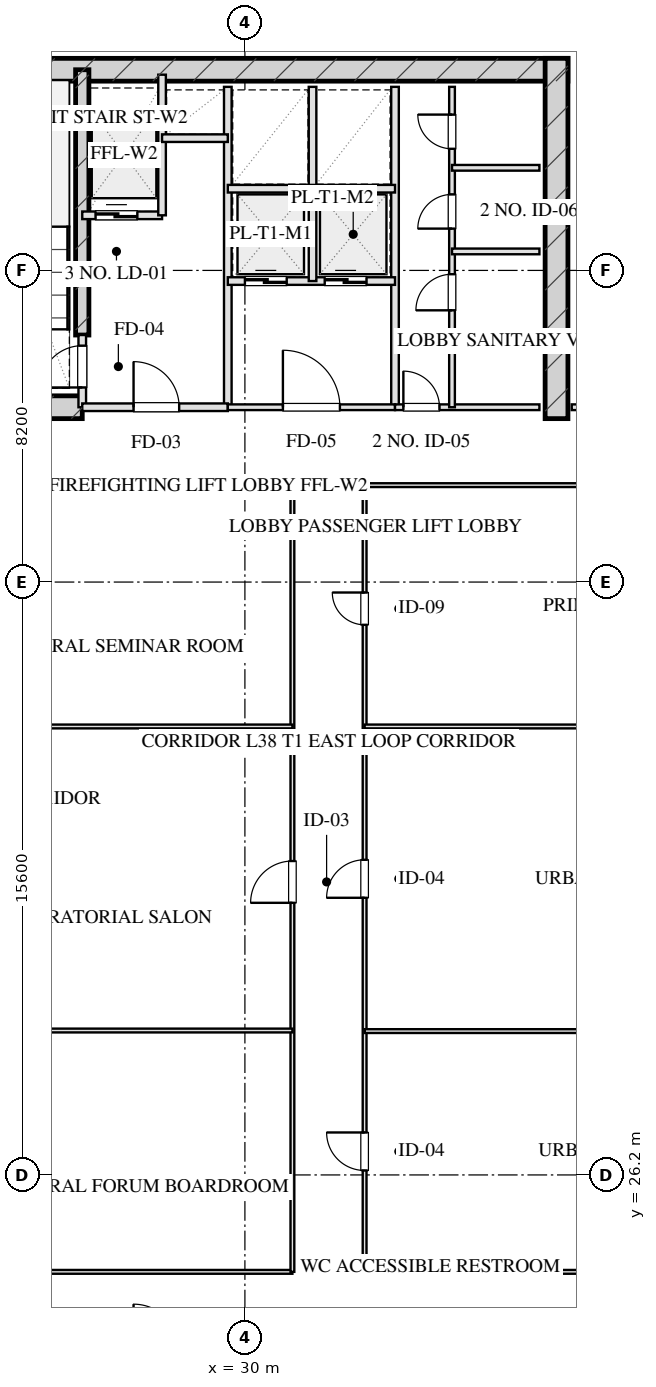
"""IFC4 building model, lengths in metres.
Left out: names, types, materials, properties, quantities, classifications, styles, units other than length and angle.
Written with IfcOpenShell. Run it as: python <this file> out.ifc"""

import sys

from ifc_helpers import new_model, si_unit, direction, frame, frame_2d, origin, place, context, subcontext, project, spatial, rectangle, extrude, element, fill, save


model = new_model("IFC4")
c1 = context("Model", 3, precision=1e-05, world=origin(), true_north=direction((0.0, 1.0)))
c2 = subcontext(c1, "Body", "Model", "MODEL_VIEW")
j1 = project(units=[si_unit("LENGTHUNIT", "METRE"), si_unit("PLANEANGLEUNIT", "RADIAN")], contexts=[c1])
p1 = place(None, origin())
s1 = spatial("IfcSite", under=j1, at=p1, CompositionType="ELEMENT")
p2 = place(p1, origin())
s2 = spatial("IfcBuilding", under=s1, at=p2, CompositionType="ELEMENT")
p3 = place(p2, frame((0.0, 0.0, 146.05)))
s3 = spatial("IfcBuildingStorey", under=s2, at=p3, CompositionType="ELEMENT", Elevation=146.05)
p4 = place(p3, frame((21.5, 55.28, 0.0), z_axis=(0.0, 0.0, 1.0), x_axis=(1.0, 0.0, 0.0)))
e1 = element("IfcWall", 1, at=p4, inside=s3, PredefinedType="SHEAR", context=c2, shape_type="SweptSolid", body=[
    extrude(rectangle(XDim=17.0, YDim=0.6, at=frame_2d((8.5, 0.0))), origin(), (0.0, 0.0, 1.0), 3.45),
])
p5 = place(p3, frame((38.2, 46.1, 0.0), z_axis=(0.0, 0.0, 1.0), x_axis=(0.0, 1.0, 0.0)))
e2 = element("IfcWall", 2, at=p5, inside=s3, PredefinedType="SHEAR", context=c2, shape_type="SweptSolid", body=[
    extrude(rectangle(XDim=9.48, YDim=0.6, at=frame_2d((4.74, 0.0))), origin(), (0.0, 0.0, 1.0), 3.45),
])
p6 = place(p3, frame((25.72, 48.3, 0.0), z_axis=(0.0, 0.0, 1.0), x_axis=(0.0, 1.0, 0.0)))
e3 = element("IfcWall", 3, at=p6, inside=s3, PredefinedType="SHEAR", context=c2, shape_type="SweptSolid", body=[
    extrude(rectangle(XDim=6.98, YDim=0.35, at=frame_2d((3.49, 0.0))), origin(), (0.0, 0.0, 1.0), 3.45),
])
p7 = place(p3, frame((21.5, 46.4, 0.0), z_axis=(0.0, 0.0, 1.0), x_axis=(1.0, 0.0, 0.0)))
e4 = element("IfcWall", 4, at=p7, inside=s3, PredefinedType="SHEAR", context=c2, shape_type="SweptSolid", body=[
    extrude(rectangle(XDim=4.22, YDim=0.6, at=frame_2d((2.11, 0.0))), origin(), (0.0, 0.0, 1.0), 3.45),
])
p8 = place(p3, frame((25.72, 46.4, 0.0), z_axis=(0.0, 0.0, 1.0), x_axis=(0.0, 1.0, 0.0)))
e5 = element("IfcWall", 5, at=p8, inside=s3, PredefinedType="PARTITIONING", context=c2, shape_type="SweptSolid", body=[
    extrude(rectangle(XDim=1.9, YDim=0.2, at=frame_2d((0.95, 0.0))), origin(), (0.0, 0.0, 1.0), 3.175),
])
p9 = place(p8, frame((0.52, 0.0, 0.0)))
e6 = element("IfcOpeningElement", 6, at=p9, cuts=e5, PredefinedType="OPENING", context=c2, shape_type="SweptSolid", body=[
    extrude(rectangle(XDim=1.1, YDim=2.05, at=frame_2d((0.55, 1.025))), frame((0.0, 0.11, 0.0), z_axis=(0.0, -1.0, 0.0), x_axis=(1.0, 0.0, 0.0)), (0.0, 0.0, 1.0), 0.22),
])
p10 = place(p3, frame((29.55, 46.4, 0.0), z_axis=(0.0, 0.0, 1.0), x_axis=(0.0, 1.0, 0.0)))
e7 = element("IfcWall", 7, at=p10, inside=s3, PredefinedType="PARTITIONING", context=c2, shape_type="SweptSolid", body=[
    extrude(rectangle(XDim=8.43, YDim=0.2, at=frame_2d((4.215, 0.0))), origin(), (0.0, 0.0, 1.0), 3.175),
])
p11 = place(p3, frame((25.72, 46.4, 0.0), z_axis=(0.0, 0.0, 1.0), x_axis=(1.0, 0.0, 0.0)))
e8 = element("IfcWall", 8, at=p11, inside=s3, PredefinedType="PARTITIONING", context=c2, shape_type="SweptSolid", body=[
    extrude(rectangle(XDim=3.83, YDim=0.2, at=frame_2d((1.915, 0.0))), origin(), (0.0, 0.0, 1.0), 3.175),
])
p12 = place(p11, frame((1.35, 0.0, 0.0)))
e9 = element("IfcOpeningElement", 9, at=p12, cuts=e8, PredefinedType="OPENING", context=c2, shape_type="SweptSolid", body=[
    extrude(rectangle(XDim=1.2, YDim=2.05, at=frame_2d((0.6, 1.025))), frame((0.0, 0.11, 0.0), z_axis=(0.0, -1.0, 0.0), x_axis=(1.0, 0.0, 0.0)), (0.0, 0.0, 1.0), 0.22),
])
p13 = place(p3, frame((25.72, 51.45, 0.0), z_axis=(0.0, 0.0, 1.0), x_axis=(1.0, 0.0, 0.0)))
e10 = element("IfcWall", 10, at=p13, inside=s3, PredefinedType="PARTITIONING", context=c2, shape_type="SweptSolid", body=[
    extrude(rectangle(XDim=2.1, YDim=0.2, at=frame_2d((1.05, 0.0))), origin(), (0.0, 0.0, 1.0), 3.175),
])
p14 = place(p13, frame((0.35, 0.0, 0.0)))
e11 = element("IfcOpeningElement", 11, at=p14, cuts=e10, PredefinedType="OPENING", context=c2, shape_type="SweptSolid", body=[
    extrude(rectangle(XDim=1.1, YDim=2.05, at=frame_2d((0.55, 1.025))), frame((0.0, 0.11, 0.0), z_axis=(0.0, -1.0, 0.0), x_axis=(1.0, 0.0, 0.0)), (0.0, 0.0, 1.0), 0.22),
])
p15 = place(p3, frame((27.82, 51.45, 0.0), z_axis=(0.0, 0.0, 1.0), x_axis=(0.0, 1.0, 0.0)))
e12 = element("IfcWall", 12, at=p15, inside=s3, PredefinedType="PARTITIONING", context=c2, shape_type="SweptSolid", body=[
    extrude(rectangle(XDim=3.7, YDim=0.2, at=frame_2d((1.85, 0.0))), origin(), (0.0, 0.0, 1.0), 3.175),
])
p16 = place(p3, frame((27.82, 53.48, 0.0), z_axis=(0.0, 0.0, 1.0), x_axis=(1.0, 0.0, 0.0)))
e13 = element("IfcWall", 13, at=p16, inside=s3, PredefinedType="PARTITIONING", context=c2, shape_type="SweptSolid", body=[
    extrude(rectangle(XDim=1.73, YDim=0.2, at=frame_2d((0.865, 0.0))), origin(), (0.0, 0.0, 1.0), 3.175),
])
p17 = place(p3, frame((33.95, 46.4, 0.0), z_axis=(0.0, 0.0, 1.0), x_axis=(0.0, 1.0, 0.0)))
e14 = element("IfcWall", 14, at=p17, inside=s3, PredefinedType="PARTITIONING", context=c2, shape_type="SweptSolid", body=[
    extrude(rectangle(XDim=8.43, YDim=0.2, at=frame_2d((4.215, 0.0))), origin(), (0.0, 0.0, 1.0), 3.175),
])
p18 = place(p3, frame((29.55, 46.4, 0.0), z_axis=(0.0, 0.0, 1.0), x_axis=(1.0, 0.0, 0.0)))
e15 = element("IfcWall", 15, at=p18, inside=s3, PredefinedType="PARTITIONING", context=c2, shape_type="SweptSolid", body=[
    extrude(rectangle(XDim=4.4, YDim=0.15, at=frame_2d((2.2, 0.0))), origin(), (0.0, 0.0, 1.0), 3.175),
])
p19 = place(p18, frame((1.45, 0.0, 0.0)))
e16 = element("IfcOpeningElement", 16, at=p19, cuts=e15, PredefinedType="OPENING", context=c2, shape_type="SweptSolid", body=[
    extrude(rectangle(XDim=1.5, YDim=2.05, at=frame_2d((0.75, 1.025))), frame((0.0, 0.085, 0.0), z_axis=(0.0, -1.0, 0.0), x_axis=(1.0, 0.0, 0.0)), (0.0, 0.0, 1.0), 0.17),
])
p20 = place(p3, frame((29.55, 49.72, 0.0), z_axis=(0.0, 0.0, 1.0), x_axis=(1.0, 0.0, 0.0)))
e17 = element("IfcWall", 17, at=p20, inside=s3, PredefinedType="PARTITIONING", context=c2, shape_type="SweptSolid", body=[
    extrude(rectangle(XDim=4.4, YDim=0.2, at=frame_2d((2.2, 0.0))), origin(), (0.0, 0.0, 1.0), 3.175),
])
p21 = place(p20, frame((0.45, 0.0, 0.0)))
e18 = element("IfcOpeningElement", 18, at=p21, cuts=e17, PredefinedType="OPENING", context=c2, shape_type="SweptSolid", body=[
    extrude(rectangle(XDim=1.1, YDim=2.05, at=frame_2d((0.55, 1.025))), frame((0.0, 0.11, 0.0), z_axis=(0.0, -1.0, 0.0), x_axis=(1.0, 0.0, 0.0)), (0.0, 0.0, 1.0), 0.22),
])
p22 = place(p20, frame((2.55, 0.0, 0.0)))
e19 = element("IfcOpeningElement", 19, at=p22, cuts=e17, PredefinedType="OPENING", context=c2, shape_type="SweptSolid", body=[
    extrude(rectangle(XDim=1.1, YDim=2.05, at=frame_2d((0.55, 1.025))), frame((0.0, 0.11, 0.0), z_axis=(0.0, -1.0, 0.0), x_axis=(1.0, 0.0, 0.0)), (0.0, 0.0, 1.0), 0.22),
])
p23 = place(p3, frame((31.78, 49.72, 0.0), z_axis=(0.0, 0.0, 1.0), x_axis=(0.0, 1.0, 0.0)))
e20 = element("IfcWall", 20, at=p23, inside=s3, PredefinedType="PARTITIONING", context=c2, shape_type="SweptSolid", body=[
    extrude(rectangle(XDim=5.11, YDim=0.2, at=frame_2d((2.555, 0.0))), origin(), (0.0, 0.0, 1.0), 3.175),
])
p24 = place(p3, frame((29.55, 52.15, 0.0), z_axis=(0.0, 0.0, 1.0), x_axis=(1.0, 0.0, 0.0)))
e21 = element("IfcWall", 21, at=p24, inside=s3, PredefinedType="PARTITIONING", context=c2, shape_type="SweptSolid", body=[
    extrude(rectangle(XDim=4.4, YDim=0.2, at=frame_2d((2.2, 0.0))), origin(), (0.0, 0.0, 1.0), 3.175),
])
p25 = place(p3, frame((33.95, 46.4, 0.0), z_axis=(0.0, 0.0, 1.0), x_axis=(1.0, 0.0, 0.0)))
e22 = element("IfcWall", 22, at=p25, inside=s3, PredefinedType="PARTITIONING", context=c2, shape_type="SweptSolid", body=[
    extrude(rectangle(XDim=3.8, YDim=0.15, at=frame_2d((1.9, 0.0))), origin(), (0.0, 0.0, 1.0), 3.175),
])
p26 = place(p25, frame((0.22, 0.0, 0.0)))
e23 = element("IfcOpeningElement", 23, at=p26, cuts=e22, PredefinedType="OPENING", context=c2, shape_type="SweptSolid", body=[
    extrude(rectangle(XDim=0.95, YDim=2.05, at=frame_2d((0.475, 1.025))), frame((0.0, 0.085, 0.0), z_axis=(0.0, -1.0, 0.0), x_axis=(1.0, 0.0, 0.0)), (0.0, 0.0, 1.0), 0.17),
])
p27 = place(p3, frame((35.45, 46.4, 0.0), z_axis=(0.0, 0.0, 1.0), x_axis=(0.0, 1.0, 0.0)))
e24 = element("IfcWall", 24, at=p27, inside=s3, PredefinedType="PARTITIONING", context=c2, shape_type="SweptSolid", body=[
    extrude(rectangle(XDim=8.43, YDim=0.15, at=frame_2d((4.215, 0.0))), origin(), (0.0, 0.0, 1.0), 2.765),
])
p28 = place(p27, frame((2.55, 0.0, 0.0)))
e25 = element("IfcOpeningElement", 25, at=p28, cuts=e24, PredefinedType="OPENING", context=c2, shape_type="SweptSolid", body=[
    extrude(rectangle(XDim=0.95, YDim=2.05, at=frame_2d((0.475, 1.025))), frame((0.0, 0.085, 0.0), z_axis=(0.0, -1.0, 0.0), x_axis=(1.0, 0.0, 0.0)), (0.0, 0.0, 1.0), 0.17),
])
p29 = place(p27, frame((4.7, 0.0, 0.0)))
e26 = element("IfcOpeningElement", 26, at=p29, cuts=e24, PredefinedType="OPENING", context=c2, shape_type="SweptSolid", body=[
    extrude(rectangle(XDim=0.9, YDim=2.05, at=frame_2d((0.45, 1.025))), frame((0.0, 0.085, 0.0), z_axis=(0.0, -1.0, 0.0), x_axis=(1.0, 0.0, 0.0)), (0.0, 0.0, 1.0), 0.17),
])
p30 = place(p27, frame((6.8, 0.0, 0.0)))
e27 = element("IfcOpeningElement", 27, at=p30, cuts=e24, PredefinedType="OPENING", context=c2, shape_type="SweptSolid", body=[
    extrude(rectangle(XDim=0.9, YDim=2.05, at=frame_2d((0.45, 1.025))), frame((0.0, 0.085, 0.0), z_axis=(0.0, -1.0, 0.0), x_axis=(1.0, 0.0, 0.0)), (0.0, 0.0, 1.0), 0.17),
])
for number, where, z_axis, x_axis in (
    (28, (35.45, 50.5, 0.0), (0.0, 0.0, 1.0), (1.0, 0.0, 0.0)),
    (29, (35.45, 52.7, 0.0), (0.0, 0.0, 1.0), (1.0, 0.0, 0.0)),
):
    element("IfcWall", number, at=place(p3, frame(where, z_axis=z_axis, x_axis=x_axis)), inside=s3, PredefinedType="PARTITIONING", context=c2, shape_type="SweptSolid", body=[
        extrude(rectangle(XDim=2.3, YDim=0.15, at=frame_2d((1.15, 0.0))), origin(), (0.0, 0.0, 1.0), 3.175),
    ])
p31 = place(p3, frame((38.6, 46.4, 0.0), z_axis=(0.0, 0.0, 1.0), x_axis=(1.0, 0.0, 0.0)))
e30 = element("IfcWall", 30, at=p31, inside=s3, PredefinedType="PARTITIONING", context=c2, shape_type="SweptSolid", body=[
    extrude(rectangle(XDim=10.0, YDim=0.15, at=frame_2d((5.0, 0.0))), origin(), (0.0, 0.0, 1.0), 3.175),
])
p32 = place(p31, frame((4.2, 0.0, 0.0)))
e31 = element("IfcOpeningElement", 31, at=p32, cuts=e30, PredefinedType="OPENING", context=c2, shape_type="SweptSolid", body=[
    extrude(rectangle(XDim=0.85, YDim=2.05, at=frame_2d((0.425, 1.025))), frame((0.0, 0.085, 0.0), z_axis=(0.0, -1.0, 0.0), x_axis=(1.0, 0.0, 0.0)), (0.0, 0.0, 1.0), 0.17),
])
p33 = place(p3, frame((22.3, 23.65, 0.0), z_axis=(0.0, 0.0, 1.0), x_axis=(1.0, 0.0, 0.0)))
e32 = element("IfcWall", 32, at=p33, inside=s3, PredefinedType="MOVABLE", context=c2, shape_type="SweptSolid", body=[
    extrude(rectangle(XDim=8.95, YDim=0.1, at=frame_2d((4.475, 0.0))), origin(), (0.0, 0.0, 1.0), 3.175),
])
p34 = place(p3, frame((33.15, 23.65, 0.0), z_axis=(0.0, 0.0, 1.0), x_axis=(1.0, 0.0, 0.0)))
e33 = element("IfcWall", 33, at=p34, inside=s3, PredefinedType="MOVABLE", context=c2, shape_type="SweptSolid", body=[
    extrude(rectangle(XDim=15.45, YDim=0.1, at=frame_2d((7.725, 0.0))), origin(), (0.0, 0.0, 1.0), 3.175),
])
p35 = place(p3, frame((22.3, 44.35, 0.0), z_axis=(0.0, 0.0, 1.0), x_axis=(1.0, 0.0, 0.0)))
e34 = element("IfcWall", 34, at=p35, inside=s3, PredefinedType="MOVABLE", context=c2, shape_type="SweptSolid", body=[
    extrude(rectangle(XDim=8.95, YDim=0.1, at=frame_2d((4.475, 0.0))), origin(), (0.0, 0.0, 1.0), 3.175),
])
p36 = place(p3, frame((33.15, 44.35, 0.0), z_axis=(0.0, 0.0, 1.0), x_axis=(1.0, 0.0, 0.0)))
e35 = element("IfcWall", 35, at=p36, inside=s3, PredefinedType="MOVABLE", context=c2, shape_type="SweptSolid", body=[
    extrude(rectangle(XDim=15.45, YDim=0.1, at=frame_2d((7.725, 0.0))), origin(), (0.0, 0.0, 1.0), 3.175),
])
p37 = place(p3, frame((31.25, 23.65, 0.0), z_axis=(0.0, 0.0, 1.0), x_axis=(0.0, 1.0, 0.0)))
e36 = element("IfcWall", 36, at=p37, inside=s3, PredefinedType="MOVABLE", context=c2, shape_type="SweptSolid", body=[
    extrude(rectangle(XDim=20.7, YDim=0.1, at=frame_2d((10.35, 0.0))), origin(), (0.0, 0.0, 1.0), 3.175),
])
p38 = place(p37, frame((9.71, 0.0, 0.0)))
e37 = element("IfcOpeningElement", 37, at=p38, cuts=e36, PredefinedType="OPENING", context=c2, shape_type="SweptSolid", body=[
    extrude(rectangle(XDim=1.1, YDim=2.05, at=frame_2d((0.55, 1.025))), frame((0.0, 0.06, 0.0), z_axis=(0.0, -1.0, 0.0), x_axis=(1.0, 0.0, 0.0)), (0.0, 0.0, 1.0), 0.12),
])
p39 = place(p3, frame((33.15, 23.65, 0.0), z_axis=(0.0, 0.0, 1.0), x_axis=(0.0, 1.0, 0.0)))
e38 = element("IfcWall", 38, at=p39, inside=s3, PredefinedType="MOVABLE", context=c2, shape_type="SweptSolid", body=[
    extrude(rectangle(XDim=20.7, YDim=0.1, at=frame_2d((10.35, 0.0))), origin(), (0.0, 0.0, 1.0), 3.175),
])
p40 = place(p39, frame((2.667, 0.0, 0.0)))
e39 = element("IfcOpeningElement", 39, at=p40, cuts=e38, PredefinedType="OPENING", context=c2, shape_type="SweptSolid", body=[
    extrude(rectangle(XDim=1.0, YDim=2.05, at=frame_2d((0.5, 1.025))), frame((0.0, 0.06, 0.0), z_axis=(0.0, -1.0, 0.0), x_axis=(1.0, 0.0, 0.0)), (0.0, 0.0, 1.0), 0.12),
])
p41 = place(p39, frame((9.843, 0.0, 0.0)))
e40 = element("IfcOpeningElement", 40, at=p41, cuts=e38, PredefinedType="OPENING", context=c2, shape_type="SweptSolid", body=[
    extrude(rectangle(XDim=1.0, YDim=2.05, at=frame_2d((0.5, 1.025))), frame((0.0, 0.06, 0.0), z_axis=(0.0, -1.0, 0.0), x_axis=(1.0, 0.0, 0.0)), (0.0, 0.0, 1.0), 0.12),
])
p42 = place(p39, frame((17.025, 0.0, 0.0)))
e41 = element("IfcOpeningElement", 41, at=p42, cuts=e38, PredefinedType="OPENING", context=c2, shape_type="SweptSolid", body=[
    extrude(rectangle(XDim=0.85, YDim=2.05, at=frame_2d((0.425, 1.025))), frame((0.0, 0.06, 0.0), z_axis=(0.0, -1.0, 0.0), x_axis=(1.0, 0.0, 0.0)), (0.0, 0.0, 1.0), 0.12),
])
for number, where, z_axis, x_axis in (
    (42, (22.3, 30.0, 0.0), (0.0, 0.0, 1.0), (1.0, 0.0, 0.0)),
    (43, (22.3, 38.0, 0.0), (0.0, 0.0, 1.0), (1.0, 0.0, 0.0)),
):
    element("IfcWall", number, at=place(p3, frame(where, z_axis=z_axis, x_axis=x_axis)), inside=s3, PredefinedType="MOVABLE", context=c2, shape_type="SweptSolid", body=[
        extrude(rectangle(XDim=8.95, YDim=0.1, at=frame_2d((4.475, 0.0))), origin(), (0.0, 0.0, 1.0), 3.175),
    ])
for number, where, z_axis, x_axis in (
    (44, (33.15, 29.985, 0.0), (0.0, 0.0, 1.0), (1.0, 0.0, 0.0)),
    (45, (33.15, 38.0, 0.0), (0.0, 0.0, 1.0), (1.0, 0.0, 0.0)),
):
    element("IfcWall", number, at=place(p3, frame(where, z_axis=z_axis, x_axis=x_axis)), inside=s3, PredefinedType="MOVABLE", context=c2, shape_type="SweptSolid", body=[
        extrude(rectangle(XDim=15.45, YDim=0.1, at=frame_2d((7.725, 0.0))), origin(), (0.0, 0.0, 1.0), 3.175),
    ])
p43 = place(p9, origin())
e46 = element("IfcDoor", 46, at=p43, inside=s3, OperationType="SINGLE_SWING_LEFT", PredefinedType="DOOR", context=c2, shape_type="SweptSolid", body=[
    extrude(rectangle(XDim=1.1, YDim=2.05, at=frame_2d((0.55, 1.025))), frame((0.0, 0.025, 0.0), z_axis=(0.0, -1.0, 0.0), x_axis=(1.0, 0.0, 0.0)), (0.0, 0.0, 1.0), 0.05),
])
fill(e6, e46)
p44 = place(p12, origin())
e47 = element("IfcDoor", 47, at=p44, inside=s3, OperationType="SINGLE_SWING_LEFT", PredefinedType="DOOR", context=c2, shape_type="SweptSolid", body=[
    extrude(rectangle(XDim=1.2, YDim=2.05, at=frame_2d((0.6, 1.025))), frame((0.0, 0.025, 0.0), z_axis=(0.0, -1.0, 0.0), x_axis=(1.0, 0.0, 0.0)), (0.0, 0.0, 1.0), 0.05),
])
fill(e9, e47)
p45 = place(p14, origin())
e48 = element("IfcDoor", 48, at=p45, inside=s3, OperationType="DOUBLE_DOOR_SLIDING", PredefinedType="DOOR", context=c2, shape_type="SweptSolid", body=[
    extrude(rectangle(XDim=1.1, YDim=2.05, at=frame_2d((0.55, 1.025))), frame((0.0, 0.025, 0.0), z_axis=(0.0, -1.0, 0.0), x_axis=(1.0, 0.0, 0.0)), (0.0, 0.0, 1.0), 0.05),
])
fill(e11, e48)
p46 = place(p19, origin())
e49 = element("IfcDoor", 49, at=p46, inside=s3, OperationType="SINGLE_SWING_LEFT", PredefinedType="DOOR", context=c2, shape_type="SweptSolid", body=[
    extrude(rectangle(XDim=1.5, YDim=2.05, at=frame_2d((0.75, 1.025))), frame((0.0, 0.025, 0.0), z_axis=(0.0, -1.0, 0.0), x_axis=(1.0, 0.0, 0.0)), (0.0, 0.0, 1.0), 0.05),
])
fill(e16, e49)
p47 = place(p21, origin())
e50 = element("IfcDoor", 50, at=p47, inside=s3, OperationType="DOUBLE_DOOR_SLIDING", PredefinedType="DOOR", context=c2, shape_type="SweptSolid", body=[
    extrude(rectangle(XDim=1.1, YDim=2.05, at=frame_2d((0.55, 1.025))), frame((0.0, 0.025, 0.0), z_axis=(0.0, -1.0, 0.0), x_axis=(1.0, 0.0, 0.0)), (0.0, 0.0, 1.0), 0.05),
])
fill(e18, e50)
p48 = place(p22, origin())
e51 = element("IfcDoor", 51, at=p48, inside=s3, OperationType="DOUBLE_DOOR_SLIDING", PredefinedType="DOOR", context=c2, shape_type="SweptSolid", body=[
    extrude(rectangle(XDim=1.1, YDim=2.05, at=frame_2d((0.55, 1.025))), frame((0.0, 0.025, 0.0), z_axis=(0.0, -1.0, 0.0), x_axis=(1.0, 0.0, 0.0)), (0.0, 0.0, 1.0), 0.05),
])
fill(e19, e51)
p49 = place(p26, origin())
e52 = element("IfcDoor", 52, at=p49, inside=s3, OperationType="SINGLE_SWING_LEFT", PredefinedType="DOOR", context=c2, shape_type="SweptSolid", body=[
    extrude(rectangle(XDim=0.95, YDim=2.05, at=frame_2d((0.475, 1.025))), frame((0.0, 0.025, 0.0), z_axis=(0.0, -1.0, 0.0), x_axis=(1.0, 0.0, 0.0)), (0.0, 0.0, 1.0), 0.05),
])
fill(e23, e52)
p50 = place(p28, origin())
e53 = element("IfcDoor", 53, at=p50, inside=s3, OperationType="SINGLE_SWING_LEFT", PredefinedType="DOOR", context=c2, shape_type="SweptSolid", body=[
    extrude(rectangle(XDim=0.95, YDim=2.05, at=frame_2d((0.475, 1.025))), frame((0.0, 0.025, 0.0), z_axis=(0.0, -1.0, 0.0), x_axis=(1.0, 0.0, 0.0)), (0.0, 0.0, 1.0), 0.05),
])
fill(e25, e53)
p51 = place(p29, origin())
e54 = element("IfcDoor", 54, at=p51, inside=s3, OperationType="SINGLE_SWING_LEFT", PredefinedType="DOOR", context=c2, shape_type="SweptSolid", body=[
    extrude(rectangle(XDim=0.9, YDim=2.05, at=frame_2d((0.45, 1.025))), frame((0.0, 0.025, 0.0), z_axis=(0.0, -1.0, 0.0), x_axis=(1.0, 0.0, 0.0)), (0.0, 0.0, 1.0), 0.05),
])
fill(e26, e54)
p52 = place(p30, origin())
e55 = element("IfcDoor", 55, at=p52, inside=s3, OperationType="SINGLE_SWING_RIGHT", PredefinedType="DOOR", context=c2, shape_type="SweptSolid", body=[
    extrude(rectangle(XDim=0.9, YDim=2.05, at=frame_2d((0.45, 1.025))), frame((0.0, 0.025, 0.0), z_axis=(0.0, -1.0, 0.0), x_axis=(1.0, 0.0, 0.0)), (0.0, 0.0, 1.0), 0.05),
])
fill(e27, e55)
p53 = place(p38, origin())
e56 = element("IfcDoor", 56, at=p53, inside=s3, OperationType="SINGLE_SWING_LEFT", PredefinedType="DOOR", context=c2, shape_type="SweptSolid", body=[
    extrude(rectangle(XDim=1.1, YDim=2.05, at=frame_2d((0.55, 1.025))), frame((0.0, 0.025, 0.0), z_axis=(0.0, -1.0, 0.0), x_axis=(1.0, 0.0, 0.0)), (0.0, 0.0, 1.0), 0.05),
])
fill(e37, e56)
p54 = place(p40, origin())
e57 = element("IfcDoor", 57, at=p54, inside=s3, OperationType="SINGLE_SWING_RIGHT", PredefinedType="DOOR", context=c2, shape_type="SweptSolid", body=[
    extrude(rectangle(XDim=1.0, YDim=2.05, at=frame_2d((0.5, 1.025))), frame((0.0, 0.025, 0.0), z_axis=(0.0, -1.0, 0.0), x_axis=(1.0, 0.0, 0.0)), (0.0, 0.0, 1.0), 0.05),
])
fill(e39, e57)
p55 = place(p41, origin())
e58 = element("IfcDoor", 58, at=p55, inside=s3, OperationType="SINGLE_SWING_LEFT", PredefinedType="DOOR", context=c2, shape_type="SweptSolid", body=[
    extrude(rectangle(XDim=1.0, YDim=2.05, at=frame_2d((0.5, 1.025))), frame((0.0, 0.025, 0.0), z_axis=(0.0, -1.0, 0.0), x_axis=(1.0, 0.0, 0.0)), (0.0, 0.0, 1.0), 0.05),
])
fill(e40, e58)
p56 = place(p42, origin())
e59 = element("IfcDoor", 59, at=p56, inside=s3, OperationType="SINGLE_SWING_RIGHT", PredefinedType="DOOR", context=c2, shape_type="SweptSolid", body=[
    extrude(rectangle(XDim=0.85, YDim=2.05, at=frame_2d((0.425, 1.025))), frame((0.0, 0.025, 0.0), z_axis=(0.0, -1.0, 0.0), x_axis=(1.0, 0.0, 0.0)), (0.0, 0.0, 1.0), 0.05),
])
fill(e41, e59)
save(model, sys.argv[1])
